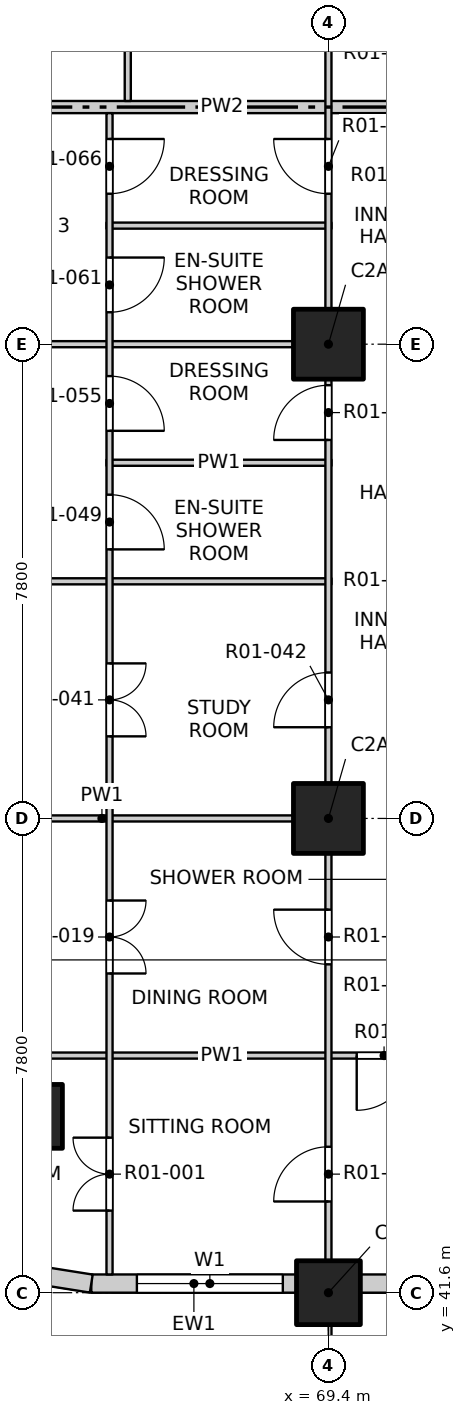
"""IFC4 building model, lengths in metres.
Left out: names, types, materials, properties, quantities, classifications, styles, units other than length and angle.
Written with IfcOpenShell. Run it as: python <this file> out.ifc"""

import sys

from ifc_helpers import new_model, si_unit, direction, frame, frame_2d, origin, origin_2d, place, context, subcontext, project, spatial, rectangle, extrude, element, fill, save


model = new_model("IFC4")
c1 = context("Model", 3, precision=1e-05, world=origin(), true_north=direction((0.0, 1.0)))
c2 = subcontext(c1, "Body", "Model", "MODEL_VIEW")
j1 = project(units=[si_unit("LENGTHUNIT", "METRE"), si_unit("PLANEANGLEUNIT", "RADIAN")], contexts=[c1])
p1 = place(None, origin())
s1 = spatial("IfcSite", under=j1, at=p1, CompositionType="ELEMENT")
p2 = place(p1, origin())
s2 = spatial("IfcBuilding", under=s1, at=p2, CompositionType="ELEMENT")
p3 = place(p2, frame((0.0, 0.0, 19.5)))
s3 = spatial("IfcBuildingStorey", under=s2, at=p3, CompositionType="ELEMENT", Elevation=19.5)
for number, where, z_axis, x_axis in (
    (1, (64.5, 44.5, -0.25), (0.0, 0.0, 1.0), (1.0, 0.0, 0.0)),
    (2, (69.4, 41.6, -0.25), (0.0, 0.0, 1.0), (1.0, 0.0, 0.0)),
):
    element("IfcColumn", number, at=place(p3, frame(where, z_axis=z_axis, x_axis=x_axis)), inside=s3, PredefinedType="COLUMN", context=c2, shape_type="SweptSolid", body=[
        extrude(rectangle(XDim=1.05, YDim=1.05, at=origin_2d()), origin(), (0.0, 0.0, 1.0), 3.4),
    ])
for number, where, z_axis, x_axis in (
    (3, (69.4, 49.4, -0.25), (0.0, 0.0, 1.0), (1.0, 0.0, 0.0)),
    (4, (69.4, 57.2, -0.25), (0.0, 0.0, 1.0), (1.0, 0.0, 0.0)),
):
    element("IfcColumn", number, at=place(p3, frame(where, z_axis=z_axis, x_axis=x_axis)), inside=s3, PredefinedType="COLUMN", context=c2, shape_type="SweptSolid", body=[
        extrude(rectangle(XDim=1.15, YDim=1.15, at=origin_2d()), origin(), (0.0, 0.0, 1.0), 3.4),
    ])
p4 = place(p3, frame((65.5, 41.75, 0.0), z_axis=(0.0, 0.0, 1.0), x_axis=(1.0, 0.0, 0.0)))
e5 = element("IfcWall", 5, at=p4, inside=s3, PredefinedType="SOLIDWALL", context=c2, shape_type="SweptSolid", body=[
    extrude(rectangle(XDim=3.375, YDim=0.3, at=frame_2d((1.688, 0.0))), origin(), (0.0, 0.0, 1.0), 2.7),
])
p5 = place(p4, frame((0.75, 0.0, 0.9)))
e6 = element("IfcOpeningElement", 6, at=p5, cuts=e5, PredefinedType="OPENING", context=c2, shape_type="SweptSolid", body=[
    extrude(rectangle(XDim=2.4, YDim=1.8, at=frame_2d((1.2, 0.9))), frame((0.0, 0.16, 0.0), z_axis=(0.0, -1.0, 0.0), x_axis=(1.0, 0.0, 0.0)), (0.0, 0.0, 1.0), 0.32),
])
p6 = place(p3, frame((69.925, 41.75, 0.0), z_axis=(0.0, 0.0, 1.0), x_axis=(1.0, 0.0, 0.0)))
e7 = element("IfcWall", 7, at=p6, inside=s3, PredefinedType="SOLIDWALL", context=c2, shape_type="SweptSolid", body=[
    extrude(rectangle(XDim=6.75, YDim=0.3, at=frame_2d((3.375, 0.0))), origin(), (0.0, 0.0, 1.0), 2.7),
])
p7 = place(p6, frame((0.525, 0.0, 0.0)))
e8 = element("IfcOpeningElement", 8, at=p7, cuts=e7, PredefinedType="OPENING", context=c2, shape_type="SweptSolid", body=[
    extrude(rectangle(XDim=1.8, YDim=2.4, at=frame_2d((0.9, 1.2))), frame((0.0, 0.16, 0.0), z_axis=(0.0, -1.0, 0.0), x_axis=(1.0, 0.0, 0.0)), (0.0, 0.0, 1.0), 0.32),
])
p8 = place(p6, frame((4.125, 0.0, 0.9)))
e9 = element("IfcOpeningElement", 9, at=p8, cuts=e7, PredefinedType="OPENING", context=c2, shape_type="SweptSolid", body=[
    extrude(rectangle(XDim=2.4, YDim=1.8, at=frame_2d((1.2, 0.9))), frame((0.0, 0.16, 0.0), z_axis=(0.0, -1.0, 0.0), x_axis=(1.0, 0.0, 0.0)), (0.0, 0.0, 1.0), 0.32),
])
p9 = place(p3, frame((64.341, 41.934, 0.0), z_axis=(0.0, 0.0, 1.0), x_axis=(0.987678452879, -0.156496880861, 0.0)))
e10 = element("IfcWall", 10, at=p9, inside=s3, PredefinedType="SOLIDWALL", context=c2, shape_type="SweptSolid", body=[
    extrude(rectangle(XDim=1.173, YDim=0.3, at=frame_2d((0.586, 0.0))), origin(), (0.0, 0.0, 1.0), 2.7),
])
p10 = place(p3, frame((61.9, 45.5, 0.0), z_axis=(0.0, 0.0, 1.0), x_axis=(1.0, 0.0, 0.0)))
e11 = element("IfcWall", 11, at=p10, inside=s3, PredefinedType="PARTITIONING", context=c2, shape_type="SweptSolid", body=[
    extrude(rectangle(XDim=11.5, YDim=0.1, at=frame_2d((5.75, 0.0))), origin(), (0.0, 0.0, 1.0), 3.15),
])
p11 = place(p10, frame((7.965, 0.0, 0.0)))
e12 = element("IfcOpeningElement", 12, at=p11, cuts=e11, PredefinedType="OPENING", context=c2, shape_type="SweptSolid", body=[
    extrude(rectangle(XDim=0.9, YDim=2.1, at=frame_2d((0.45, 1.05))), frame((0.0, 0.06, 0.0), z_axis=(0.0, -1.0, 0.0), x_axis=(1.0, 0.0, 0.0)), (0.0, 0.0, 1.0), 0.12),
])
p12 = place(p3, frame((61.9, 49.4, 0.0), z_axis=(0.0, 0.0, 1.0), x_axis=(1.0, 0.0, 0.0)))
e13 = element("IfcWall", 13, at=p12, inside=s3, PredefinedType="PARTITIONING", context=c2, shape_type="SweptSolid", body=[
    extrude(rectangle(XDim=7.55, YDim=0.1, at=frame_2d((3.775, 0.0))), origin(), (0.0, 0.0, 1.0), 2.55),
])
p13 = place(p3, frame((61.9, 53.3, 0.0), z_axis=(0.0, 0.0, 1.0), x_axis=(1.0, 0.0, 0.0)))
e14 = element("IfcWall", 14, at=p13, inside=s3, PredefinedType="PARTITIONING", context=c2, shape_type="SweptSolid", body=[
    extrude(rectangle(XDim=7.55, YDim=0.1, at=frame_2d((3.775, 0.0))), origin(), (0.0, 0.0, 1.0), 3.15),
])
p14 = place(p3, frame((65.75, 55.25, 0.0), z_axis=(0.0, 0.0, 1.0), x_axis=(1.0, 0.0, 0.0)))
e15 = element("IfcWall", 15, at=p14, inside=s3, PredefinedType="PARTITIONING", context=c2, shape_type="SweptSolid", body=[
    extrude(rectangle(XDim=3.7, YDim=0.1, at=frame_2d((1.85, 0.0))), origin(), (0.0, 0.0, 1.0), 3.15),
])
p15 = place(p3, frame((61.9, 57.2, 0.0), z_axis=(0.0, 0.0, 1.0), x_axis=(1.0, 0.0, 0.0)))
e16 = element("IfcWall", 16, at=p15, inside=s3, PredefinedType="PARTITIONING", context=c2, shape_type="SweptSolid", body=[
    extrude(rectangle(XDim=7.55, YDim=0.1, at=frame_2d((3.775, 0.0))), origin(), (0.0, 0.0, 1.0), 2.55),
])
p16 = place(p3, frame((65.75, 59.15, 0.0), z_axis=(0.0, 0.0, 1.0), x_axis=(1.0, 0.0, 0.0)))
e17 = element("IfcWall", 17, at=p16, inside=s3, PredefinedType="PARTITIONING", context=c2, shape_type="SweptSolid", body=[
    extrude(rectangle(XDim=3.7, YDim=0.1, at=frame_2d((1.85, 0.0))), origin(), (0.0, 0.0, 1.0), 3.15),
])
p17 = place(p3, frame((61.9, 61.1, 0.0), z_axis=(0.0, 0.0, 1.0), x_axis=(1.0, 0.0, 0.0)))
e18 = element("IfcWall", 18, at=p17, inside=s3, PredefinedType="PARTITIONING", context=c2, shape_type="SweptSolid", body=[
    extrude(rectangle(XDim=11.5, YDim=0.2, at=frame_2d((5.75, 0.0))), origin(), (0.0, 0.0, 1.0), 3.15),
])
p18 = place(p3, frame((65.8, 41.9, 0.0), z_axis=(0.0, 0.0, 1.0), x_axis=(0.0, 1.0, 0.0)))
e19 = element("IfcWall", 19, at=p18, inside=s3, PredefinedType="PARTITIONING", context=c2, shape_type="SweptSolid", body=[
    extrude(rectangle(XDim=19.1, YDim=0.1, at=frame_2d((9.55, 0.0))), origin(), (0.0, 0.0, 1.0), 3.15),
])
p19 = place(p18, frame((1.05, 0.0, 0.0)))
e20 = element("IfcOpeningElement", 20, at=p19, cuts=e19, PredefinedType="OPENING", context=c2, shape_type="SweptSolid", body=[
    extrude(rectangle(XDim=1.2, YDim=2.1, at=frame_2d((0.6, 1.05))), frame((0.0, 0.06, 0.0), z_axis=(0.0, -1.0, 0.0), x_axis=(1.0, 0.0, 0.0)), (0.0, 0.0, 1.0), 0.12),
])
p20 = place(p18, frame((4.95, 0.0, 0.0)))
e21 = element("IfcOpeningElement", 21, at=p20, cuts=e19, PredefinedType="OPENING", context=c2, shape_type="SweptSolid", body=[
    extrude(rectangle(XDim=1.2, YDim=2.1, at=frame_2d((0.6, 1.05))), frame((0.0, 0.06, 0.0), z_axis=(0.0, -1.0, 0.0), x_axis=(1.0, 0.0, 0.0)), (0.0, 0.0, 1.0), 0.12),
])
p21 = place(p18, frame((8.85, 0.0, 0.0)))
e22 = element("IfcOpeningElement", 22, at=p21, cuts=e19, PredefinedType="OPENING", context=c2, shape_type="SweptSolid", body=[
    extrude(rectangle(XDim=1.2, YDim=2.1, at=frame_2d((0.6, 1.05))), frame((0.0, 0.06, 0.0), z_axis=(0.0, -1.0, 0.0), x_axis=(1.0, 0.0, 0.0)), (0.0, 0.0, 1.0), 0.12),
])
p22 = place(p18, frame((11.925, 0.0, 0.0)))
e23 = element("IfcOpeningElement", 23, at=p22, cuts=e19, PredefinedType="OPENING", context=c2, shape_type="SweptSolid", body=[
    extrude(rectangle(XDim=0.9, YDim=2.1, at=frame_2d((0.45, 1.05))), frame((0.0, 0.06, 0.0), z_axis=(0.0, -1.0, 0.0), x_axis=(1.0, 0.0, 0.0)), (0.0, 0.0, 1.0), 0.12),
])
p23 = place(p18, frame((13.875, 0.0, 0.0)))
e24 = element("IfcOpeningElement", 24, at=p23, cuts=e19, PredefinedType="OPENING", context=c2, shape_type="SweptSolid", body=[
    extrude(rectangle(XDim=0.9, YDim=2.1, at=frame_2d((0.45, 1.05))), frame((0.0, 0.06, 0.0), z_axis=(0.0, -1.0, 0.0), x_axis=(1.0, 0.0, 0.0)), (0.0, 0.0, 1.0), 0.12),
])
p24 = place(p18, frame((15.825, 0.0, 0.0)))
e25 = element("IfcOpeningElement", 25, at=p24, cuts=e19, PredefinedType="OPENING", context=c2, shape_type="SweptSolid", body=[
    extrude(rectangle(XDim=0.9, YDim=2.1, at=frame_2d((0.45, 1.05))), frame((0.0, 0.06, 0.0), z_axis=(0.0, -1.0, 0.0), x_axis=(1.0, 0.0, 0.0)), (0.0, 0.0, 1.0), 0.12),
])
p25 = place(p18, frame((17.775, 0.0, 0.0)))
e26 = element("IfcOpeningElement", 26, at=p25, cuts=e19, PredefinedType="OPENING", context=c2, shape_type="SweptSolid", body=[
    extrude(rectangle(XDim=0.9, YDim=2.1, at=frame_2d((0.45, 1.05))), frame((0.0, 0.06, 0.0), z_axis=(0.0, -1.0, 0.0), x_axis=(1.0, 0.0, 0.0)), (0.0, 0.0, 1.0), 0.12),
])
p26 = place(p3, frame((66.1, 61.2, 0.0), z_axis=(0.0, 0.0, 1.0), x_axis=(0.0, 1.0, 0.0)))
e27 = element("IfcWall", 27, at=p26, inside=s3, PredefinedType="PARTITIONING", context=c2, shape_type="SweptSolid", body=[
    extrude(rectangle(XDim=7.6, YDim=0.1, at=frame_2d((3.8, 0.0))), origin(), (0.0, 0.0, 1.0), 3.15),
])
p27 = place(p26, frame((1.25, 0.0, 0.0)))
e28 = element("IfcOpeningElement", 28, at=p27, cuts=e27, PredefinedType="OPENING", context=c2, shape_type="SweptSolid", body=[
    extrude(rectangle(XDim=1.2, YDim=2.1, at=frame_2d((0.6, 1.05))), frame((0.0, 0.06, 0.0), z_axis=(0.0, -1.0, 0.0), x_axis=(1.0, 0.0, 0.0)), (0.0, 0.0, 1.0), 0.12),
])
p28 = place(p26, frame((4.325, 0.0, 0.0)))
e29 = element("IfcOpeningElement", 29, at=p28, cuts=e27, PredefinedType="OPENING", context=c2, shape_type="SweptSolid", body=[
    extrude(rectangle(XDim=0.9, YDim=2.1, at=frame_2d((0.45, 1.05))), frame((0.0, 0.06, 0.0), z_axis=(0.0, -1.0, 0.0), x_axis=(1.0, 0.0, 0.0)), (0.0, 0.0, 1.0), 0.12),
])
p29 = place(p26, frame((6.275, 0.0, 0.0)))
e30 = element("IfcOpeningElement", 30, at=p29, cuts=e27, PredefinedType="OPENING", context=c2, shape_type="SweptSolid", body=[
    extrude(rectangle(XDim=0.9, YDim=2.1, at=frame_2d((0.45, 1.05))), frame((0.0, 0.06, 0.0), z_axis=(0.0, -1.0, 0.0), x_axis=(1.0, 0.0, 0.0)), (0.0, 0.0, 1.0), 0.12),
])
p30 = place(p3, frame((69.4, 41.9, 0.0), z_axis=(0.0, 0.0, 1.0), x_axis=(0.0, 1.0, 0.0)))
e31 = element("IfcWall", 31, at=p30, inside=s3, PredefinedType="PARTITIONING", context=c2, shape_type="SweptSolid", body=[
    extrude(rectangle(XDim=7.5, YDim=0.1, at=frame_2d((3.75, 0.0))), origin(), (0.0, 0.0, 1.0), 2.55),
])
p31 = place(p30, frame((1.2, 0.0, 0.0)))
e32 = element("IfcOpeningElement", 32, at=p31, cuts=e31, PredefinedType="OPENING", context=c2, shape_type="SweptSolid", body=[
    extrude(rectangle(XDim=0.9, YDim=2.1, at=frame_2d((0.45, 1.05))), frame((0.0, 0.06, 0.0), z_axis=(0.0, -1.0, 0.0), x_axis=(1.0, 0.0, 0.0)), (0.0, 0.0, 1.0), 0.12),
])
p32 = place(p30, frame((5.1, 0.0, 0.0)))
e33 = element("IfcOpeningElement", 33, at=p32, cuts=e31, PredefinedType="OPENING", context=c2, shape_type="SweptSolid", body=[
    extrude(rectangle(XDim=0.9, YDim=2.1, at=frame_2d((0.45, 1.05))), frame((0.0, 0.06, 0.0), z_axis=(0.0, -1.0, 0.0), x_axis=(1.0, 0.0, 0.0)), (0.0, 0.0, 1.0), 0.12),
])
p33 = place(p3, frame((69.4, 49.4, 0.0), z_axis=(0.0, 0.0, 1.0), x_axis=(0.0, 1.0, 0.0)))
e34 = element("IfcWall", 34, at=p33, inside=s3, PredefinedType="PARTITIONING", context=c2, shape_type="SweptSolid", body=[
    extrude(rectangle(XDim=31.2, YDim=0.1, at=frame_2d((15.6, 0.0))), origin(), (0.0, 0.0, 1.0), 3.15),
])
p34 = place(p33, frame((1.5, 0.0, 0.0)))
e35 = element("IfcOpeningElement", 35, at=p34, cuts=e34, PredefinedType="OPENING", context=c2, shape_type="SweptSolid", body=[
    extrude(rectangle(XDim=0.9, YDim=2.1, at=frame_2d((0.45, 1.05))), frame((0.0, 0.06, 0.0), z_axis=(0.0, -1.0, 0.0), x_axis=(1.0, 0.0, 0.0)), (0.0, 0.0, 1.0), 0.12),
])
p35 = place(p33, frame((6.225, 0.0, 0.0)))
e36 = element("IfcOpeningElement", 36, at=p35, cuts=e34, PredefinedType="OPENING", context=c2, shape_type="SweptSolid", body=[
    extrude(rectangle(XDim=0.9, YDim=2.1, at=frame_2d((0.45, 1.05))), frame((0.0, 0.06, 0.0), z_axis=(0.0, -1.0, 0.0), x_axis=(1.0, 0.0, 0.0)), (0.0, 0.0, 1.0), 0.12),
])
p36 = place(p33, frame((10.275, 0.0, 0.0)))
e37 = element("IfcOpeningElement", 37, at=p36, cuts=e34, PredefinedType="OPENING", context=c2, shape_type="SweptSolid", body=[
    extrude(rectangle(XDim=0.9, YDim=2.1, at=frame_2d((0.45, 1.05))), frame((0.0, 0.06, 0.0), z_axis=(0.0, -1.0, 0.0), x_axis=(1.0, 0.0, 0.0)), (0.0, 0.0, 1.0), 0.12),
])
p37 = place(p33, frame((13.2, 0.0, 0.0)))
e38 = element("IfcOpeningElement", 38, at=p37, cuts=e34, PredefinedType="OPENING", context=c2, shape_type="SweptSolid", body=[
    extrude(rectangle(XDim=0.9, YDim=2.1, at=frame_2d((0.45, 1.05))), frame((0.0, 0.06, 0.0), z_axis=(0.0, -1.0, 0.0), x_axis=(1.0, 0.0, 0.0)), (0.0, 0.0, 1.0), 0.12),
])
p38 = place(p33, frame((18.075, 0.0, 0.0)))
e39 = element("IfcOpeningElement", 39, at=p38, cuts=e34, PredefinedType="OPENING", context=c2, shape_type="SweptSolid", body=[
    extrude(rectangle(XDim=0.9, YDim=2.1, at=frame_2d((0.45, 1.05))), frame((0.0, 0.06, 0.0), z_axis=(0.0, -1.0, 0.0), x_axis=(1.0, 0.0, 0.0)), (0.0, 0.0, 1.0), 0.12),
])
p39 = place(p33, frame((21.8, 0.0, 0.0)))
e40 = element("IfcOpeningElement", 40, at=p39, cuts=e34, PredefinedType="OPENING", context=c2, shape_type="SweptSolid", body=[
    extrude(rectangle(XDim=0.9, YDim=2.1, at=frame_2d((0.45, 1.05))), frame((0.0, 0.06, 0.0), z_axis=(0.0, -1.0, 0.0), x_axis=(1.0, 0.0, 0.0)), (0.0, 0.0, 1.0), 0.12),
])
p40 = place(p33, frame((24.9, 0.0, 0.0)))
e41 = element("IfcOpeningElement", 41, at=p40, cuts=e34, PredefinedType="OPENING", context=c2, shape_type="SweptSolid", body=[
    extrude(rectangle(XDim=0.9, YDim=2.1, at=frame_2d((0.45, 1.05))), frame((0.0, 0.06, 0.0), z_axis=(0.0, -1.0, 0.0), x_axis=(1.0, 0.0, 0.0)), (0.0, 0.0, 1.0), 0.12),
])
p41 = place(p33, frame((29.6, 0.0, 0.0)))
e42 = element("IfcOpeningElement", 42, at=p41, cuts=e34, PredefinedType="OPENING", context=c2, shape_type="SweptSolid", body=[
    extrude(rectangle(XDim=0.9, YDim=2.1, at=frame_2d((0.45, 1.05))), frame((0.0, 0.06, 0.0), z_axis=(0.0, -1.0, 0.0), x_axis=(1.0, 0.0, 0.0)), (0.0, 0.0, 1.0), 0.12),
])
p42 = place(p5, origin())
e43 = element("IfcWindow", 43, at=p42, inside=s3, PartitioningType="DOUBLE_PANEL_VERTICAL", PredefinedType="WINDOW", context=c2, shape_type="SweptSolid", body=[
    extrude(rectangle(XDim=2.4, YDim=1.8, at=frame_2d((1.2, 0.9))), frame((0.0, 0.03, 0.0), z_axis=(0.0, -1.0, 0.0), x_axis=(1.0, 0.0, 0.0)), (0.0, 0.0, 1.0), 0.06),
])
fill(e6, e43)
p43 = place(p19, origin())
e44 = element("IfcDoor", 44, at=p43, inside=s3, OperationType="DOUBLE_DOOR_SINGLE_SWING", PredefinedType="DOOR", context=c2, shape_type="SweptSolid", body=[
    extrude(rectangle(XDim=1.2, YDim=2.1, at=frame_2d((0.6, 1.05))), frame((0.0, 0.025, 0.0), z_axis=(0.0, -1.0, 0.0), x_axis=(1.0, 0.0, 0.0)), (0.0, 0.0, 1.0), 0.05),
])
fill(e20, e44)
p44 = place(p31, origin())
e45 = element("IfcDoor", 45, at=p44, inside=s3, OperationType="SINGLE_SWING_LEFT", PredefinedType="DOOR", context=c2, shape_type="SweptSolid", body=[
    extrude(rectangle(XDim=0.9, YDim=2.1, at=frame_2d((0.45, 1.05))), frame((0.0, 0.025, 0.0), z_axis=(0.0, -1.0, 0.0), x_axis=(1.0, 0.0, 0.0)), (0.0, 0.0, 1.0), 0.05),
])
fill(e32, e45)
p45 = place(p11, origin())
e46 = element("IfcDoor", 46, at=p45, inside=s3, OperationType="SINGLE_SWING_RIGHT", PredefinedType="DOOR", context=c2, shape_type="SweptSolid", body=[
    extrude(rectangle(XDim=0.9, YDim=2.1, at=frame_2d((0.45, 1.05))), frame((0.0, 0.025, 0.0), z_axis=(0.0, -1.0, 0.0), x_axis=(1.0, 0.0, 0.0)), (0.0, 0.0, 1.0), 0.05),
])
fill(e12, e46)
p46 = place(p20, origin())
e47 = element("IfcDoor", 47, at=p46, inside=s3, OperationType="DOUBLE_DOOR_SINGLE_SWING", PredefinedType="DOOR", context=c2, shape_type="SweptSolid", body=[
    extrude(rectangle(XDim=1.2, YDim=2.1, at=frame_2d((0.6, 1.05))), frame((0.0, 0.025, 0.0), z_axis=(0.0, -1.0, 0.0), x_axis=(1.0, 0.0, 0.0)), (0.0, 0.0, 1.0), 0.05),
])
fill(e21, e47)
p47 = place(p32, origin())
e48 = element("IfcDoor", 48, at=p47, inside=s3, OperationType="SINGLE_SWING_RIGHT", PredefinedType="DOOR", context=c2, shape_type="SweptSolid", body=[
    extrude(rectangle(XDim=0.9, YDim=2.1, at=frame_2d((0.45, 1.05))), frame((0.0, 0.025, 0.0), z_axis=(0.0, -1.0, 0.0), x_axis=(1.0, 0.0, 0.0)), (0.0, 0.0, 1.0), 0.05),
])
fill(e33, e48)
p48 = place(p21, origin())
e49 = element("IfcDoor", 49, at=p48, inside=s3, OperationType="DOUBLE_DOOR_SINGLE_SWING", PredefinedType="DOOR", context=c2, shape_type="SweptSolid", body=[
    extrude(rectangle(XDim=1.2, YDim=2.1, at=frame_2d((0.6, 1.05))), frame((0.0, 0.025, 0.0), z_axis=(0.0, -1.0, 0.0), x_axis=(1.0, 0.0, 0.0)), (0.0, 0.0, 1.0), 0.05),
])
fill(e22, e49)
p49 = place(p34, origin())
e50 = element("IfcDoor", 50, at=p49, inside=s3, OperationType="SINGLE_SWING_LEFT", PredefinedType="DOOR", context=c2, shape_type="SweptSolid", body=[
    extrude(rectangle(XDim=0.9, YDim=2.1, at=frame_2d((0.45, 1.05))), frame((0.0, 0.025, 0.0), z_axis=(0.0, -1.0, 0.0), x_axis=(1.0, 0.0, 0.0)), (0.0, 0.0, 1.0), 0.05),
])
fill(e35, e50)
p50 = place(p22, origin())
e51 = element("IfcDoor", 51, at=p50, inside=s3, OperationType="SINGLE_SWING_RIGHT", PredefinedType="DOOR", context=c2, shape_type="SweptSolid", body=[
    extrude(rectangle(XDim=0.9, YDim=2.1, at=frame_2d((0.45, 1.05))), frame((0.0, 0.025, 0.0), z_axis=(0.0, -1.0, 0.0), x_axis=(1.0, 0.0, 0.0)), (0.0, 0.0, 1.0), 0.05),
])
fill(e23, e51)
p51 = place(p35, origin())
e52 = element("IfcDoor", 52, at=p51, inside=s3, OperationType="SINGLE_SWING_LEFT", PredefinedType="DOOR", context=c2, shape_type="SweptSolid", body=[
    extrude(rectangle(XDim=0.9, YDim=2.1, at=frame_2d((0.45, 1.05))), frame((0.0, 0.025, 0.0), z_axis=(0.0, -1.0, 0.0), x_axis=(1.0, 0.0, 0.0)), (0.0, 0.0, 1.0), 0.05),
])
fill(e36, e52)
p52 = place(p23, origin())
e53 = element("IfcDoor", 53, at=p52, inside=s3, OperationType="SINGLE_SWING_RIGHT", PredefinedType="DOOR", context=c2, shape_type="SweptSolid", body=[
    extrude(rectangle(XDim=0.9, YDim=2.1, at=frame_2d((0.45, 1.05))), frame((0.0, 0.025, 0.0), z_axis=(0.0, -1.0, 0.0), x_axis=(1.0, 0.0, 0.0)), (0.0, 0.0, 1.0), 0.05),
])
fill(e24, e53)
p53 = place(p24, origin())
e54 = element("IfcDoor", 54, at=p53, inside=s3, OperationType="SINGLE_SWING_LEFT", PredefinedType="DOOR", context=c2, shape_type="SweptSolid", body=[
    extrude(rectangle(XDim=0.9, YDim=2.1, at=frame_2d((0.45, 1.05))), frame((0.0, 0.025, 0.0), z_axis=(0.0, -1.0, 0.0), x_axis=(1.0, 0.0, 0.0)), (0.0, 0.0, 1.0), 0.05),
])
fill(e25, e54)
p54 = place(p25, origin())
e55 = element("IfcDoor", 55, at=p54, inside=s3, OperationType="SINGLE_SWING_LEFT", PredefinedType="DOOR", context=c2, shape_type="SweptSolid", body=[
    extrude(rectangle(XDim=0.9, YDim=2.1, at=frame_2d((0.45, 1.05))), frame((0.0, 0.025, 0.0), z_axis=(0.0, -1.0, 0.0), x_axis=(1.0, 0.0, 0.0)), (0.0, 0.0, 1.0), 0.05),
])
fill(e26, e55)
p55 = place(p36, origin())
e56 = element("IfcDoor", 56, at=p55, inside=s3, OperationType="SINGLE_SWING_RIGHT", PredefinedType="DOOR", context=c2, shape_type="SweptSolid", body=[
    extrude(rectangle(XDim=0.9, YDim=2.1, at=frame_2d((0.45, 1.05))), frame((0.0, 0.025, 0.0), z_axis=(0.0, -1.0, 0.0), x_axis=(1.0, 0.0, 0.0)), (0.0, 0.0, 1.0), 0.05),
])
fill(e37, e56)
save(model, sys.argv[1])
